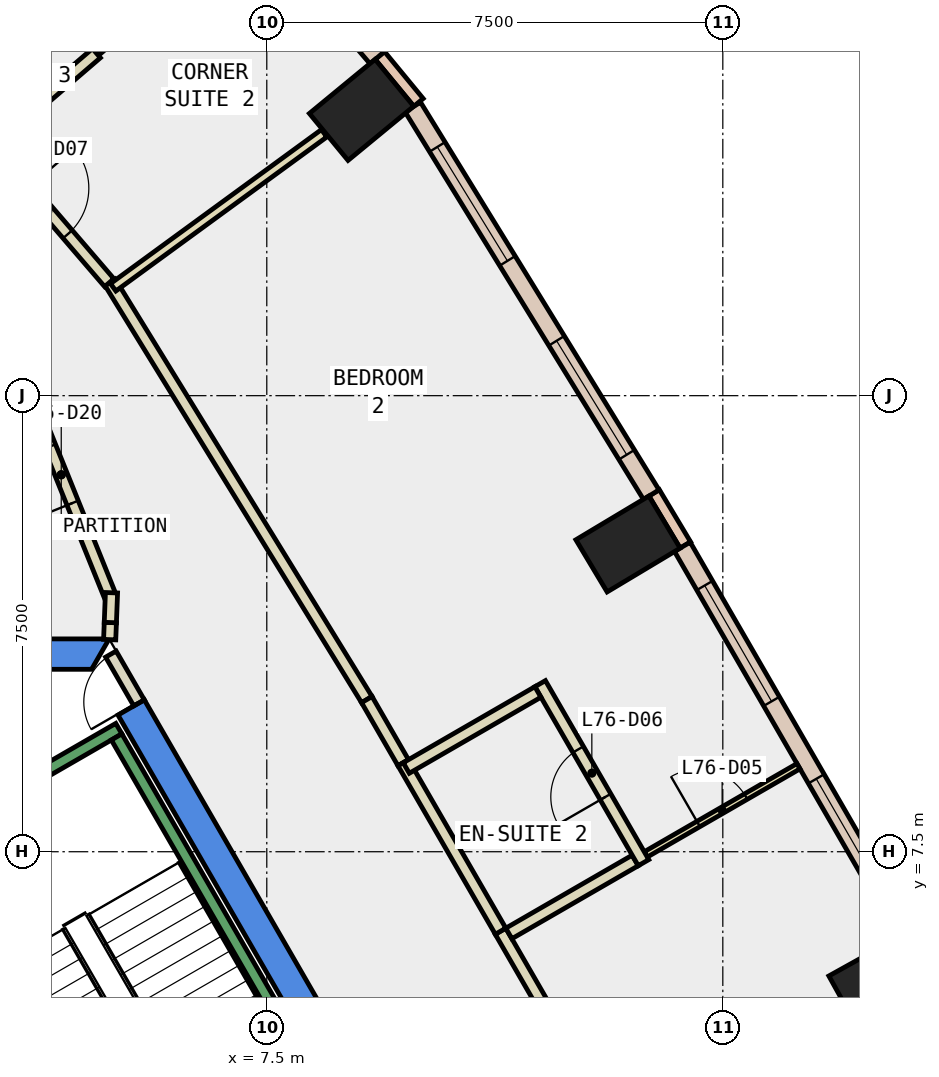
"""IFC4 building model, lengths in metres.
Left out: names, types, materials, properties, quantities, classifications, styles, units other than length and angle.
Written with IfcOpenShell. Run it as: python <this file> out.ifc"""

import sys

from ifc_helpers import new_model, si_unit, direction, frame, frame_2d, origin, origin_2d, place, context, subcontext, project, spatial, polyline, rectangle, outline, extrude, element, fill, save


model = new_model("IFC4")
c1 = context("Model", 3, precision=1e-05, world=origin(), true_north=direction((0.0, 1.0)))
c2 = subcontext(c1, "Body", "Model", "MODEL_VIEW")
j1 = project(units=[si_unit("LENGTHUNIT", "METRE"), si_unit("PLANEANGLEUNIT", "RADIAN")], contexts=[c1])
p1 = place(None, origin())
s1 = spatial("IfcSite", under=j1, at=p1, CompositionType="ELEMENT")
p2 = place(p1, origin())
s2 = spatial("IfcBuilding", under=s1, at=p2, CompositionType="ELEMENT")
p3 = place(p2, frame((0.0, 0.0, 322.4)))
s3 = spatial("IfcBuildingStorey", under=s2, at=p3, CompositionType="ELEMENT", Elevation=322.4)
for number, where, z_axis, x_axis in (
    (1, (17.599, 5.36, -0.34), (0.0, 0.0, 1.0), (-0.486, 0.874, 0.0)),
    (2, (13.441, 12.561, -0.34), (0.0, 0.0, 1.0), (-0.514, 0.858, 0.0)),
    (3, (9.059, 19.7, -0.34), (0.0, 0.0, 1.0), (-0.636, 0.772, 0.0)),
):
    element("IfcColumn", number, at=place(p3, frame(where, z_axis=z_axis, x_axis=x_axis)), inside=s3, PredefinedType="COLUMN", context=c2, shape_type="SweptSolid", body=[
        extrude(rectangle(XDim=1.0, YDim=1.4, at=origin_2d()), origin(), (0.0, 0.0, 1.0), 3.34),
    ])
p4 = place(p3, frame((0.0, 0.0, -0.34)))
e4 = element("IfcWall", 4, at=p4, inside=s3, PredefinedType="SHEAR", context=c2, shape_type="SweptSolid", body=[
    extrude(outline(polyline([(5.486, 9.998), (5.053, 9.748), (9.238, 2.5), (9.815, 2.5), (5.486, 9.998)])), origin(), (0.0, 0.0, 1.0), 3.34),
])
p5 = place(p3, frame((0.0, 0.0, -0.34)))
e5 = element("IfcWall", 5, at=p5, inside=s3, PredefinedType="SHEAR", context=c2, shape_type="SweptSolid", body=[
    extrude(outline(polyline([(4.907, 11.0), (-4.907, 11.0), (-4.619, 10.5), (4.619, 10.5), (4.907, 11.0)])), origin(), (0.0, 0.0, 1.0), 3.34),
])
for number, where, z_axis, x_axis in (
    (6, (14.384, 12.544, 0.0), (0.0, 0.0, 1.0), (-0.514, 0.858, 0.0)),
    (7, (9.995, 19.822, 0.0), (0.0, 0.0, 1.0), (-0.636, 0.772, 0.0)),
):
    element("IfcWall", number, at=place(p3, frame(where, z_axis=z_axis, x_axis=x_axis)), inside=s3, PredefinedType="STANDARD", context=c2, shape_type="SweptSolid", body=[
        extrude(rectangle(XDim=1.0, YDim=0.2, at=frame_2d((0.5, 0.0))), origin(), (0.0, 0.0, 1.0), 3.0),
    ])
p6 = place(p3, frame((18.005, 6.156, 0.0), z_axis=(0.0, 0.0, 1.0), x_axis=(-0.499958474759, 0.866049377066, 0.0)))
e8 = element("IfcWall", 8, at=p6, inside=s3, PredefinedType="STANDARD", context=c2, shape_type="SweptSolid", body=[
    extrude(rectangle(XDim=7.342, YDim=0.3, at=frame_2d((3.671, 0.0))), origin(), (0.0, 0.0, 1.0), 3.0),
])
p7 = place(p6, frame((0.736, 0.0, 0.9)))
e9 = element("IfcOpeningElement", 9, at=p7, cuts=e8, PredefinedType="OPENING", context=c2, shape_type="SweptSolid", body=[
    extrude(rectangle(XDim=2.2, YDim=2.0, at=frame_2d((1.1, 1.0))), frame((0.0, 0.16, 0.0), z_axis=(0.0, -1.0, 0.0), x_axis=(1.0, 0.0, 0.0)), (0.0, 0.0, 1.0), 0.32),
])
p8 = place(p6, frame((4.407, 0.0, 0.9)))
e10 = element("IfcOpeningElement", 10, at=p8, cuts=e8, PredefinedType="OPENING", context=c2, shape_type="SweptSolid", body=[
    extrude(rectangle(XDim=2.2, YDim=2.0, at=frame_2d((1.1, 1.0))), frame((0.0, 0.16, 0.0), z_axis=(0.0, -1.0, 0.0), x_axis=(1.0, 0.0, 0.0)), (0.0, 0.0, 1.0), 0.32),
])
p9 = place(p3, frame((13.823, 13.372, 0.0), z_axis=(0.0, 0.0, 1.0), x_axis=(-0.524004608874, 0.851715427757, 0.0)))
e11 = element("IfcWall", 11, at=p9, inside=s3, PredefinedType="STANDARD", context=c2, shape_type="SweptSolid", body=[
    extrude(rectangle(XDim=7.485, YDim=0.3, at=frame_2d((3.742, 0.0))), origin(), (0.0, 0.0, 1.0), 3.0),
])
p10 = place(p9, frame((0.771, 0.0, 0.9)))
e12 = element("IfcOpeningElement", 12, at=p10, cuts=e11, PredefinedType="OPENING", context=c2, shape_type="SweptSolid", body=[
    extrude(rectangle(XDim=2.2, YDim=2.0, at=frame_2d((1.1, 1.0))), frame((0.0, 0.16, 0.0), z_axis=(0.0, -1.0, 0.0), x_axis=(1.0, 0.0, 0.0)), (0.0, 0.0, 1.0), 0.32),
])
p11 = place(p9, frame((4.514, 0.0, 0.9)))
e13 = element("IfcOpeningElement", 13, at=p11, cuts=e11, PredefinedType="OPENING", context=c2, shape_type="SweptSolid", body=[
    extrude(rectangle(XDim=2.2, YDim=2.0, at=frame_2d((1.1, 1.0))), frame((0.0, 0.16, 0.0), z_axis=(0.0, -1.0, 0.0), x_axis=(1.0, 0.0, 0.0)), (0.0, 0.0, 1.0), 0.32),
])
p12 = place(p3, frame((9.313, 20.555, 0.0), z_axis=(0.0, 0.0, 1.0), x_axis=(-0.651684474108, 0.758490175419, 0.0)))
e14 = element("IfcWall", 14, at=p12, inside=s3, PredefinedType="STANDARD", context=c2, shape_type="SweptSolid", body=[
    extrude(rectangle(XDim=4.748, YDim=0.3, at=frame_2d((2.374, 0.0))), origin(), (0.0, 0.0, 1.0), 3.0),
])
p13 = place(p12, frame((1.674, 0.0, 0.9)))
e15 = element("IfcOpeningElement", 15, at=p13, cuts=e14, PredefinedType="OPENING", context=c2, shape_type="SweptSolid", body=[
    extrude(rectangle(XDim=1.4, YDim=2.0, at=frame_2d((0.7, 1.0))), frame((0.0, 0.16, 0.0), z_axis=(0.0, -1.0, 0.0), x_axis=(1.0, 0.0, 0.0)), (0.0, 0.0, 1.0), 0.32),
])
p14 = place(p3, frame((4.916, 10.988, 0.0), z_axis=(0.0, 0.0, 1.0), x_axis=(0.039066592023, 0.999236609311, 0.0)))
e16 = element("IfcWall", 16, at=p14, inside=s3, PredefinedType="PARTITIONING", context=c2, shape_type="SweptSolid", body=[
    extrude(rectangle(XDim=0.281, YDim=0.2, at=frame_2d((0.141, 0.0))), origin(), (0.0, 0.0, 1.0), 2.4),
])
p15 = place(p3, frame((4.923, 11.707, 0.0), z_axis=(0.0, 0.0, 1.0), x_axis=(-0.374122865642, 0.927379146522, 0.0)))
e17 = element("IfcWall", 17, at=p15, inside=s3, PredefinedType="PARTITIONING", context=c2, shape_type="SweptSolid", body=[
    extrude(rectangle(XDim=4.296, YDim=0.2, at=frame_2d((2.148, 0.0))), origin(), (0.0, 0.0, 1.0), 3.0),
])
p16 = place(p15, frame((1.648, 0.0, 0.0)))
e18 = element("IfcOpeningElement", 18, at=p16, cuts=e17, PredefinedType="OPENING", context=c2, shape_type="SweptSolid", body=[
    extrude(rectangle(XDim=1.0, YDim=2.1, at=frame_2d((0.5, 1.05))), frame((0.0, 0.11, 0.0), z_axis=(0.0, -1.0, 0.0), x_axis=(1.0, 0.0, 0.0)), (0.0, 0.0, 1.0), 0.22),
])
p17 = place(p3, frame((11.344, 6.193, 0.0), z_axis=(0.0, 0.0, 1.0), x_axis=(0.50004096614, -0.86600175068, 0.0)))
e19 = element("IfcWall", 19, at=p17, inside=s3, PredefinedType="PARTITIONING", context=c2, shape_type="SweptSolid", body=[
    extrude(rectangle(XDim=3.782, YDim=0.2, at=frame_2d((1.891, 0.0))), origin(), (0.0, 0.0, 1.0), 3.0),
])
p18 = place(p3, frame((4.922, 16.867, 0.0), z_axis=(0.0, 0.0, 1.0), x_axis=(0.523943621984, -0.851752945978, 0.0)))
e20 = element("IfcWall", 20, at=p18, inside=s3, PredefinedType="PARTITIONING", context=c2, shape_type="SweptSolid", body=[
    extrude(rectangle(XDim=8.06, YDim=0.2, at=frame_2d((4.03, 0.0))), origin(), (0.0, 0.0, 1.0), 3.0),
])
p19 = place(p3, frame((9.145, 10.002, 0.0), z_axis=(0.0, 0.0, 1.0), x_axis=(0.499798886082, -0.866141485827, 0.0)))
e21 = element("IfcWall", 21, at=p19, inside=s3, PredefinedType="PARTITIONING", context=c2, shape_type="SweptSolid", body=[
    extrude(rectangle(XDim=1.198, YDim=0.2, at=frame_2d((0.599, 0.0))), origin(), (0.0, 0.0, 1.0), 3.0),
])
p20 = place(p3, frame((9.744, 8.964, 0.0), z_axis=(0.0, 0.0, 1.0), x_axis=(0.500290307618, -0.865857729713, 0.0)))
e22 = element("IfcWall", 22, at=p20, inside=s3, PredefinedType="PARTITIONING", context=c2, shape_type="SweptSolid", body=[
    extrude(rectangle(XDim=3.2, YDim=0.2, at=frame_2d((1.6, 0.0))), origin(), (0.0, 0.0, 1.0), 3.0),
])
p21 = place(p3, frame((2.889, 19.209, 0.0), z_axis=(0.0, 0.0, 1.0), x_axis=(0.651686040861, -0.758488829283, 0.0)))
e23 = element("IfcWall", 23, at=p21, inside=s3, PredefinedType="PARTITIONING", context=c2, shape_type="SweptSolid", body=[
    extrude(rectangle(XDim=3.1, YDim=0.2, at=frame_2d((1.55, 0.0))), origin(), (0.0, 0.0, 1.0), 3.0),
])
p22 = place(p21, frame((1.05, 0.0, 0.0)))
e24 = element("IfcOpeningElement", 24, at=p22, cuts=e23, PredefinedType="OPENING", context=c2, shape_type="SweptSolid", body=[
    extrude(rectangle(XDim=1.0, YDim=2.1, at=frame_2d((0.5, 1.05))), frame((0.0, 0.11, 0.0), z_axis=(0.0, -1.0, 0.0), x_axis=(1.0, 0.0, 0.0)), (0.0, 0.0, 1.0), 0.22),
])
p23 = place(p3, frame((13.733, 7.456, 0.0), z_axis=(0.0, 0.0, 1.0), x_axis=(0.865990674793, 0.500060147554, 0.0)))
e25 = element("IfcWall", 25, at=p23, inside=s3, PredefinedType="PARTITIONING", context=c2, shape_type="SweptSolid", body=[
    extrude(rectangle(XDim=2.9, YDim=0.1, at=frame_2d((1.45, 0.0))), origin(), (0.0, 0.0, 1.0), 3.0),
])
p24 = place(p23, frame((1.0, 0.0, 0.0)))
e26 = element("IfcOpeningElement", 26, at=p24, cuts=e25, PredefinedType="OPENING", context=c2, shape_type="SweptSolid", body=[
    extrude(rectangle(XDim=0.9, YDim=2.1, at=frame_2d((0.45, 1.05))), frame((0.0, 0.06, 0.0), z_axis=(0.0, -1.0, 0.0), x_axis=(1.0, 0.0, 0.0)), (0.0, 0.0, 1.0), 0.12),
])
p25 = place(p3, frame((11.481, 6.156, 0.0), z_axis=(0.0, 0.0, 1.0), x_axis=(0.865999212041, 0.500045362686, 0.0)))
e27 = element("IfcWall", 27, at=p25, inside=s3, PredefinedType="PARTITIONING", context=c2, shape_type="SweptSolid", body=[
    extrude(rectangle(XDim=2.4, YDim=0.2, at=frame_2d((1.2, 0.0))), origin(), (0.0, 0.0, 1.0), 3.0),
])
p26 = place(p3, frame((13.696, 7.32, 0.0), z_axis=(0.0, 0.0, 1.0), x_axis=(-0.500070584245, 0.865984648116, 0.0)))
e28 = element("IfcWall", 28, at=p26, inside=s3, PredefinedType="PARTITIONING", context=c2, shape_type="SweptSolid", body=[
    extrude(rectangle(XDim=3.399, YDim=0.2, at=frame_2d((1.7, 0.0))), origin(), (0.0, 0.0, 1.0), 3.0),
])
p27 = place(p26, frame((1.25, 0.0, 0.0)))
e29 = element("IfcOpeningElement", 29, at=p27, cuts=e28, PredefinedType="OPENING", context=c2, shape_type="SweptSolid", body=[
    extrude(rectangle(XDim=0.9, YDim=2.1, at=frame_2d((0.45, 1.05))), frame((0.0, 0.11, 0.0), z_axis=(0.0, -1.0, 0.0), x_axis=(1.0, 0.0, 0.0)), (0.0, 0.0, 1.0), 0.22),
])
p28 = place(p3, frame((11.959, 10.127, 0.0), z_axis=(0.0, 0.0, 1.0), x_axis=(-0.866022959057, -0.500004234368, 0.0)))
e30 = element("IfcWall", 30, at=p28, inside=s3, PredefinedType="PARTITIONING", context=c2, shape_type="SweptSolid", body=[
    extrude(rectangle(XDim=2.5, YDim=0.2, at=frame_2d((1.25, 0.0))), origin(), (0.0, 0.0, 1.0), 3.0),
])
p29 = place(p3, frame((4.974, 16.782, 0.0), z_axis=(0.0, 0.0, 1.0), x_axis=(0.807621211013, 0.589701602102, 0.0)))
e31 = element("IfcWall", 31, at=p29, inside=s3, PredefinedType="PARTITIONING", context=c2, shape_type="SweptSolid", body=[
    extrude(rectangle(XDim=4.295, YDim=0.15, at=frame_2d((2.148, 0.0))), origin(), (0.0, 0.0, 1.0), 3.0),
])
p30 = place(p3, frame((4.698, 20.632, 0.0), z_axis=(0.0, 0.0, 1.0), x_axis=(0.75843091069, 0.651753445491, 0.0)))
e32 = element("IfcWall", 32, at=p30, inside=s3, PredefinedType="PARTITIONING", context=c2, shape_type="SweptSolid", body=[
    extrude(rectangle(XDim=3.3, YDim=0.1, at=frame_2d((1.65, 0.0))), origin(), (0.0, 0.0, 1.0), 3.0),
])
p31 = place(p30, frame((1.2, 0.0, 0.0)))
e33 = element("IfcOpeningElement", 33, at=p31, cuts=e32, PredefinedType="OPENING", context=c2, shape_type="SweptSolid", body=[
    extrude(rectangle(XDim=0.9, YDim=2.1, at=frame_2d((0.45, 1.05))), frame((0.0, 0.06, 0.0), z_axis=(0.0, -1.0, 0.0), x_axis=(1.0, 0.0, 0.0)), (0.0, 0.0, 1.0), 0.12),
])
p32 = place(p3, frame((2.954, 19.133, 0.0), z_axis=(0.0, 0.0, 1.0), x_axis=(0.758341579104, 0.65185738425, 0.0)))
e34 = element("IfcWall", 34, at=p32, inside=s3, PredefinedType="PARTITIONING", context=c2, shape_type="SweptSolid", body=[
    extrude(rectangle(XDim=2.3, YDim=0.2, at=frame_2d((1.15, 0.0))), origin(), (0.0, 0.0, 1.0), 3.0),
])
p33 = place(p3, frame((5.399, 9.948, 0.0), z_axis=(0.0, 0.0, 1.0), x_axis=(-0.499882215713, 0.866093395895, 0.0)))
e35 = element("IfcWall", 35, at=p33, inside=s3, PredefinedType="PARTITIONING", context=c2, shape_type="SweptSolid", body=[
    extrude(rectangle(XDim=0.926, YDim=0.2, at=frame_2d((0.463, 0.0))), origin(), (0.0, 0.0, 1.0), 2.4),
])
p34 = place(p33, frame((0.017, 0.0, 0.0)))
e36 = element("IfcOpeningElement", 36, at=p34, cuts=e35, PredefinedType="OPENING", context=c2, shape_type="SweptSolid", body=[
    extrude(rectangle(XDim=0.9, YDim=2.1, at=frame_2d((0.45, 1.05))), frame((0.0, 0.11, 0.0), z_axis=(0.0, -1.0, 0.0), x_axis=(1.0, 0.0, 0.0)), (0.0, 0.0, 1.0), 0.22),
])
p35 = place(p3, frame((4.927, 11.269, 0.0), z_axis=(0.0, 0.0, 1.0), x_axis=(0.038834659047, 0.999245650106, 0.0)))
e37 = element("IfcWall", 37, at=p35, inside=s3, PredefinedType="PARTITIONING", context=c2, shape_type="SweptSolid", body=[
    extrude(rectangle(XDim=0.49, YDim=0.2, at=frame_2d((0.245, 0.0))), origin(), (0.0, 0.0, 1.0), 3.0),
])
p36 = place(p3, frame((2.7, 8.158, 0.0), z_axis=(0.0, 0.0, 1.0), x_axis=(0.86611865017, 0.499838457731, 0.0)))
e38 = element("IfcWall", 38, at=p36, inside=s3, PredefinedType="STANDARD", context=c2, shape_type="SweptSolid", body=[
    extrude(rectangle(XDim=2.733, YDim=0.2, at=frame_2d((1.366, 0.0))), origin(), (0.0, 0.0, 1.0), 3.0),
])
p37 = place(p3, frame((4.843, 1.312, 0.0), z_axis=(0.0, 0.0, 1.0), x_axis=(-0.499963383562, 0.866046543262, 0.0)))
e39 = element("IfcWall", 39, at=p37, inside=s3, PredefinedType="STANDARD", context=c2, shape_type="SweptSolid", body=[
    extrude(rectangle(XDim=6.9, YDim=0.2, at=frame_2d((3.45, 0.0))), origin(), (0.0, 0.0, 1.0), 3.0),
])
p38 = place(p37, frame((0.45, 0.0, 0.0)))
e40 = element("IfcOpeningElement", 40, at=p38, cuts=e39, PredefinedType="OPENING", context=c2, shape_type="SweptSolid", body=[
    extrude(rectangle(XDim=1.1, YDim=2.2, at=frame_2d((0.55, 1.1))), frame((0.0, 0.11, 0.0), z_axis=(0.0, -1.0, 0.0), x_axis=(1.0, 0.0, 0.0)), (0.0, 0.0, 1.0), 0.22),
])
p39 = place(p3, frame((8.48, 3.412, 0.0), z_axis=(0.0, 0.0, 1.0), x_axis=(-0.499978703459, 0.866037698999, 0.0)))
e41 = element("IfcWall", 41, at=p39, inside=s3, PredefinedType="STANDARD", context=c2, shape_type="SweptSolid", body=[
    extrude(rectangle(XDim=6.9, YDim=0.2, at=frame_2d((3.45, 0.0))), origin(), (0.0, 0.0, 1.0), 3.0),
])
p40 = place(p7, origin())
e42 = element("IfcWindow", 42, at=p40, inside=s3, PartitioningType="SINGLE_PANEL", PredefinedType="WINDOW", context=c2, shape_type="SweptSolid", body=[
    extrude(rectangle(XDim=2.2, YDim=2.0, at=frame_2d((1.1, 1.0))), frame((0.0, 0.03, 0.0), z_axis=(0.0, -1.0, 0.0), x_axis=(1.0, 0.0, 0.0)), (0.0, 0.0, 1.0), 0.06),
])
fill(e9, e42)
p41 = place(p8, origin())
e43 = element("IfcWindow", 43, at=p41, inside=s3, PartitioningType="SINGLE_PANEL", PredefinedType="WINDOW", context=c2, shape_type="SweptSolid", body=[
    extrude(rectangle(XDim=2.2, YDim=2.0, at=frame_2d((1.1, 1.0))), frame((0.0, 0.03, 0.0), z_axis=(0.0, -1.0, 0.0), x_axis=(1.0, 0.0, 0.0)), (0.0, 0.0, 1.0), 0.06),
])
fill(e10, e43)
p42 = place(p10, origin())
e44 = element("IfcWindow", 44, at=p42, inside=s3, PartitioningType="SINGLE_PANEL", PredefinedType="WINDOW", context=c2, shape_type="SweptSolid", body=[
    extrude(rectangle(XDim=2.2, YDim=2.0, at=frame_2d((1.1, 1.0))), frame((0.0, 0.03, 0.0), z_axis=(0.0, -1.0, 0.0), x_axis=(1.0, 0.0, 0.0)), (0.0, 0.0, 1.0), 0.06),
])
fill(e12, e44)
p43 = place(p11, origin())
e45 = element("IfcWindow", 45, at=p43, inside=s3, PartitioningType="SINGLE_PANEL", PredefinedType="WINDOW", context=c2, shape_type="SweptSolid", body=[
    extrude(rectangle(XDim=2.2, YDim=2.0, at=frame_2d((1.1, 1.0))), frame((0.0, 0.03, 0.0), z_axis=(0.0, -1.0, 0.0), x_axis=(1.0, 0.0, 0.0)), (0.0, 0.0, 1.0), 0.06),
])
fill(e13, e45)
p44 = place(p24, origin())
e46 = element("IfcDoor", 46, at=p44, inside=s3, OperationType="SINGLE_SWING_LEFT", PredefinedType="DOOR", context=c2, shape_type="SweptSolid", body=[
    extrude(rectangle(XDim=0.9, YDim=2.1, at=frame_2d((0.45, 1.05))), frame((0.0, 0.025, 0.0), z_axis=(0.0, -1.0, 0.0), x_axis=(1.0, 0.0, 0.0)), (0.0, 0.0, 1.0), 0.05),
])
fill(e26, e46)
p45 = place(p27, origin())
e47 = element("IfcDoor", 47, at=p45, inside=s3, OperationType="SINGLE_SWING_LEFT", PredefinedType="DOOR", context=c2, shape_type="SweptSolid", body=[
    extrude(rectangle(XDim=0.9, YDim=2.1, at=frame_2d((0.45, 1.05))), frame((0.0, 0.025, 0.0), z_axis=(0.0, -1.0, 0.0), x_axis=(1.0, 0.0, 0.0)), (0.0, 0.0, 1.0), 0.05),
])
fill(e29, e47)
p46 = place(p22, origin())
e48 = element("IfcDoor", 48, at=p46, inside=s3, OperationType="SINGLE_SWING_LEFT", PredefinedType="DOOR", context=c2, shape_type="SweptSolid", body=[
    extrude(rectangle(XDim=1.0, YDim=2.1, at=frame_2d((0.5, 1.05))), frame((0.0, 0.025, 0.0), z_axis=(0.0, -1.0, 0.0), x_axis=(1.0, 0.0, 0.0)), (0.0, 0.0, 1.0), 0.05),
])
fill(e24, e48)
p47 = place(p16, origin())
e49 = element("IfcDoor", 49, at=p47, inside=s3, OperationType="SINGLE_SWING_LEFT", PredefinedType="DOOR", context=c2, shape_type="SweptSolid", body=[
    extrude(rectangle(XDim=1.0, YDim=2.1, at=frame_2d((0.5, 1.05))), frame((0.0, 0.025, 0.0), z_axis=(0.0, -1.0, 0.0), x_axis=(1.0, 0.0, 0.0)), (0.0, 0.0, 1.0), 0.05),
])
fill(e18, e49)
p48 = place(p34, origin())
e50 = element("IfcDoor", 50, at=p48, inside=s3, OperationType="SINGLE_SWING_LEFT", PredefinedType="DOOR", context=c2, shape_type="SweptSolid", body=[
    extrude(rectangle(XDim=0.9, YDim=2.1, at=frame_2d((0.45, 1.05))), frame((0.0, 0.025, 0.0), z_axis=(0.0, -1.0, 0.0), x_axis=(1.0, 0.0, 0.0)), (0.0, 0.0, 1.0), 0.05),
])
fill(e36, e50)
save(model, sys.argv[1])
